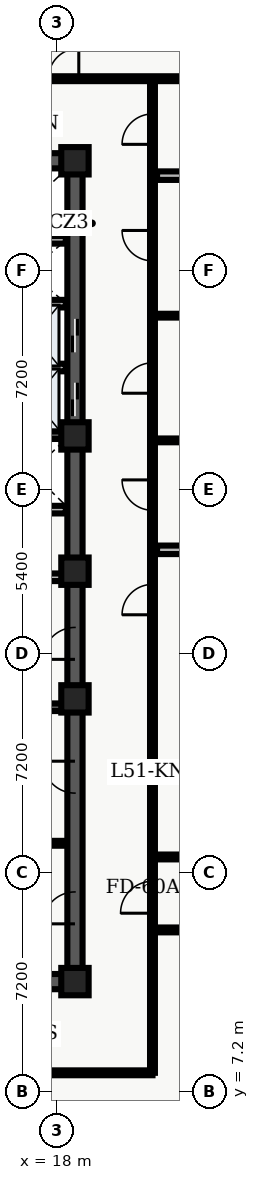
"""IFC4 building model, lengths in metres.
Left out: names, types, materials, properties, quantities, classifications, styles, units other than length and angle.
Written with IfcOpenShell. Run it as: python <this file> out.ifc"""

import sys

from ifc_helpers import new_model, entity, si_unit, converted_unit, direction, frame, origin_with_axes, origin_2d_with_axis, place, context, subcontext, project, spatial, polyline, rectangle, outline, extrude, element, fill, save


model = new_model("IFC4")
c1 = context("Model", 3, precision=1e-05, world=origin_with_axes(), true_north=direction((0.0, 1.0)))
c2 = subcontext(c1, "Body", "Model", "MODEL_VIEW")
j1 = project(units=[si_unit("LENGTHUNIT", "METRE"), converted_unit("PLANEANGLEUNIT", "DEGREE", entity("IfcPlaneAngleMeasure", 0.017), si_unit("PLANEANGLEUNIT", "RADIAN"), dimensions=[0, 0, 0, 0, 0, 0, 0])], contexts=[c1])
p1 = place(None, origin_with_axes())
s1 = spatial("IfcSite", under=j1, at=p1, CompositionType="ELEMENT")
p2 = place(p1, origin_with_axes())
s2 = spatial("IfcBuilding", under=s1, at=p2, CompositionType="ELEMENT")
p3 = place(p2, frame((0.0, 0.0, 208.2), z_axis=(0.0, 0.0, 1.0), x_axis=(1.0, 0.0, 0.0)))
s3 = spatial("IfcBuildingStorey", under=s2, at=p3, CompositionType="ELEMENT", Elevation=208.2)
p4 = place(p3, frame((11.4, 10.8, 0.0), z_axis=(0.0, 0.0, 1.0), x_axis=(1.0, 0.0, 0.0)))
e1 = element("IfcWall", 1, at=p4, inside=s3, PredefinedType="SHEAR", context=c2, shape_type="SweptSolid", body=[
    extrude(outline(polyline([(0.0, -0.25), (7.2, -0.25), (7.2, 0.25), (0.0, 0.25), (0.0, -0.25)])), origin_with_axes(), (0.0, 0.0, 1.0), 3.66),
])
p5 = place(p4, frame((2.625, 0.0, 0.0), z_axis=(0.0, 0.0, 1.0), x_axis=(1.0, 0.0, 0.0)))
e2 = element("IfcOpeningElement", 2, at=p5, cuts=e1, PredefinedType="OPENING", context=c2, shape_type="SweptSolid", body=[
    extrude(rectangle(XDim=1.05, YDim=0.52, at=origin_2d_with_axis()), origin_with_axes(), (0.0, 0.0, 1.0), 2.15),
])
p6 = place(p3, frame((11.4, 37.8, 0.0), z_axis=(0.0, 0.0, 1.0), x_axis=(1.0, 0.0, 0.0)))
e3 = element("IfcWall", 3, at=p6, inside=s3, PredefinedType="SHEAR", context=c2, shape_type="SweptSolid", body=[
    extrude(outline(polyline([(0.0, -0.25), (7.2, -0.25), (7.2, 0.25), (0.0, 0.25), (0.0, -0.25)])), origin_with_axes(), (0.0, 0.0, 1.0), 3.66),
])
p7 = place(p6, frame((2.625, 0.0, 0.0), z_axis=(0.0, 0.0, 1.0), x_axis=(1.0, 0.0, 0.0)))
e4 = element("IfcOpeningElement", 4, at=p7, cuts=e3, PredefinedType="OPENING", context=c2, shape_type="SweptSolid", body=[
    extrude(rectangle(XDim=1.05, YDim=0.52, at=origin_2d_with_axis()), origin_with_axes(), (0.0, 0.0, 1.0), 2.15),
])
p8 = place(p3, frame((18.6, 10.8, 0.0), z_axis=(0.0, 0.0, 1.0), x_axis=(0.0, 1.0, 0.0)))
e5 = element("IfcWall", 5, at=p8, inside=s3, PredefinedType="SHEAR", context=c2, shape_type="SweptSolid", body=[
    extrude(outline(polyline([(0.0, -0.25), (13.5, -0.25), (13.5, 0.25), (0.0, 0.25), (0.0, -0.25)])), origin_with_axes(), (0.0, 0.0, 1.0), 3.66),
])
p9 = place(p8, frame((11.125, 0.0, 0.0), z_axis=(0.0, 0.0, 1.0), x_axis=(1.0, 0.0, 0.0)))
e6 = element("IfcOpeningElement", 6, at=p9, cuts=e5, PredefinedType="OPENING", context=c2, shape_type="SweptSolid", body=[
    extrude(rectangle(XDim=1.05, YDim=0.52, at=origin_2d_with_axis()), origin_with_axes(), (0.0, 0.0, 1.0), 2.15),
])
p10 = place(p8, frame((2.425, 0.0, 0.0), z_axis=(0.0, 0.0, 1.0), x_axis=(1.0, 0.0, 0.0)))
e7 = element("IfcOpeningElement", 7, at=p10, cuts=e5, PredefinedType="OPENING", context=c2, shape_type="SweptSolid", body=[
    extrude(rectangle(XDim=1.05, YDim=0.52, at=origin_2d_with_axis()), origin_with_axes(), (0.0, 0.0, 1.0), 2.15),
])
p11 = place(p8, frame((6.725, 0.0, 0.0), z_axis=(0.0, 0.0, 1.0), x_axis=(1.0, 0.0, 0.0)))
e8 = element("IfcOpeningElement", 8, at=p11, cuts=e5, PredefinedType="OPENING", context=c2, shape_type="SweptSolid", body=[
    extrude(rectangle(XDim=1.05, YDim=0.52, at=origin_2d_with_axis()), origin_with_axes(), (0.0, 0.0, 1.0), 2.15),
])
p12 = place(p3, frame((18.6, 24.3, 0.0), z_axis=(0.0, 0.0, 1.0), x_axis=(0.0, 1.0, 0.0)))
e9 = element("IfcWall", 9, at=p12, inside=s3, PredefinedType="SHEAR", context=c2, shape_type="SweptSolid", body=[
    extrude(outline(polyline([(0.0, -0.25), (13.5, -0.25), (13.5, 0.25), (0.0, 0.25), (0.0, -0.25)])), origin_with_axes(), (0.0, 0.0, 1.0), 3.66),
])
p13 = place(p12, frame((5.65, 0.0, 0.0), z_axis=(0.0, 0.0, 1.0), x_axis=(1.0, 0.0, 0.0)))
e10 = element("IfcOpeningElement", 10, at=p13, cuts=e9, PredefinedType="OPENING", context=c2, shape_type="SweptSolid", body=[
    extrude(rectangle(XDim=1.1, YDim=0.52, at=origin_2d_with_axis()), origin_with_axes(), (0.0, 0.0, 1.0), 2.15),
])
p14 = place(p12, frame((7.75, 0.0, 0.0), z_axis=(0.0, 0.0, 1.0), x_axis=(1.0, 0.0, 0.0)))
e11 = element("IfcOpeningElement", 11, at=p14, cuts=e9, PredefinedType="OPENING", context=c2, shape_type="SweptSolid", body=[
    extrude(rectangle(XDim=1.1, YDim=0.52, at=origin_2d_with_axis()), origin_with_axes(), (0.0, 0.0, 1.0), 2.15),
])
for number, where, z_axis, x_axis in (
    (12, (11.65, 19.825, 0.0), (0.0, 0.0, 1.0), (1.0, 0.0, 0.0)),
    (13, (11.65, 28.775, 0.0), (0.0, 0.0, 1.0), (1.0, 0.0, 0.0)),
):
    element("IfcWall", number, at=place(p3, frame(where, z_axis=z_axis, x_axis=x_axis)), inside=s3, PredefinedType="SHEAR", context=c2, shape_type="SweptSolid", body=[
        extrude(outline(polyline([(0.0, -0.125), (6.7, -0.125), (6.7, 0.125), (0.0, 0.125), (0.0, -0.125)])), origin_with_axes(), (0.0, 0.0, 1.0), 3.66),
    ])
p15 = place(p3, frame((11.7, 24.1, 0.0), z_axis=(0.0, 0.0, 1.0), x_axis=(1.0, 0.0, 0.0)))
e14 = element("IfcWall", 14, at=p15, inside=s3, PredefinedType="SOLIDWALL", context=c2, shape_type="SweptSolid", body=[
    extrude(outline(polyline([(0.0, -0.125), (6.6, -0.125), (6.6, 0.125), (0.0, 0.125), (0.0, -0.125)])), origin_with_axes(), (0.0, 0.0, 1.0), 2.7),
])
p16 = place(p15, frame((3.6, 0.0, 0.0), z_axis=(0.0, 0.0, 1.0), x_axis=(1.0, 0.0, 0.0)))
e15 = element("IfcOpeningElement", 15, at=p16, cuts=e14, PredefinedType="OPENING", context=c2, shape_type="SweptSolid", body=[
    extrude(rectangle(XDim=0.9, YDim=0.27, at=origin_2d_with_axis()), origin_with_axes(), (0.0, 0.0, 1.0), 2.15),
])
p17 = place(p15, frame((5.65, 0.0, 0.0), z_axis=(0.0, 0.0, 1.0), x_axis=(1.0, 0.0, 0.0)))
e16 = element("IfcOpeningElement", 16, at=p17, cuts=e14, PredefinedType="OPENING", context=c2, shape_type="SweptSolid", body=[
    extrude(rectangle(XDim=0.9, YDim=0.27, at=origin_2d_with_axis()), origin_with_axes(), (0.0, 0.0, 1.0), 2.15),
])
p18 = place(p3, frame((11.7, 26.325, 0.0), z_axis=(0.0, 0.0, 1.0), x_axis=(1.0, 0.0, 0.0)))
e17 = element("IfcWall", 17, at=p18, inside=s3, PredefinedType="SOLIDWALL", context=c2, shape_type="SweptSolid", body=[
    extrude(outline(polyline([(0.0, -0.125), (6.6, -0.125), (6.6, 0.125), (0.0, 0.125), (0.0, -0.125)])), origin_with_axes(), (0.0, 0.0, 1.0), 2.7),
])
p19 = place(p18, frame((3.5, 0.0, 0.0), z_axis=(0.0, 0.0, 1.0), x_axis=(1.0, 0.0, 0.0)))
e18 = element("IfcOpeningElement", 18, at=p19, cuts=e17, PredefinedType="OPENING", context=c2, shape_type="SweptSolid", body=[
    extrude(rectangle(XDim=0.9, YDim=0.27, at=origin_2d_with_axis()), origin_with_axes(), (0.0, 0.0, 1.0), 2.15),
])
for number, where, z_axis, x_axis in (
    (19, (18.6, 10.8, 0.0), (0.0, 0.0, 1.0), (1.0, 0.0, 0.0)),
    (20, (18.6, 20.1, 0.0), (0.0, 0.0, 1.0), (1.0, 0.0, 0.0)),
    (21, (18.6, 24.3, 0.0), (0.0, 0.0, 1.0), (1.0, 0.0, 0.0)),
    (22, (18.6, 28.75, 0.0), (0.0, 0.0, 1.0), (1.0, 0.0, 0.0)),
    (23, (18.6, 37.8, 0.0), (0.0, 0.0, 1.0), (1.0, 0.0, 0.0)),
):
    element("IfcColumn", number, at=place(p3, frame(where, z_axis=z_axis, x_axis=x_axis)), inside=s3, PredefinedType="COLUMN", context=c2, shape_type="SweptSolid", body=[
        extrude(rectangle(XDim=0.9, YDim=0.9, at=origin_2d_with_axis()), origin_with_axes(), (0.0, 0.0, 1.0), 3.9),
    ])
p20 = place(p3, frame((15.84, 15.35, 0.0), z_axis=(0.0, 0.0, 1.0), x_axis=(1.0, 0.0, 0.0)))
e24 = element("IfcWall", 24, at=p20, inside=s3, PredefinedType="PARTITIONING", context=c2, shape_type="SweptSolid", body=[
    extrude(outline(polyline([(0.0, -0.08), (2.46, -0.08), (2.46, 0.08), (0.0, 0.08), (0.0, -0.08)])), origin_with_axes(), (0.0, 0.0, 1.0), 2.7),
])
for number, where, z_axis, x_axis in (
    (25, (15.84, 31.0, 0.0), (0.0, 0.0, 1.0), (1.0, 0.0, 0.0)),
    (26, (15.84, 33.1, 0.0), (0.0, 0.0, 1.0), (1.0, 0.0, 0.0)),
    (27, (15.84, 35.2, 0.0), (0.0, 0.0, 1.0), (1.0, 0.0, 0.0)),
):
    element("IfcWall", number, at=place(p3, frame(where, z_axis=z_axis, x_axis=x_axis)), inside=s3, PredefinedType="SOLIDWALL", context=c2, shape_type="SweptSolid", body=[
        extrude(outline(polyline([(0.0, -0.125), (2.46, -0.125), (2.46, 0.125), (0.0, 0.125), (0.0, -0.125)])), origin_with_axes(), (0.0, 0.0, 1.0), 2.7),
    ])
p21 = place(p3, frame((2.6, 7.8, 0.0), z_axis=(0.0, 0.0, 1.0), x_axis=(1.0, 0.0, 0.0)))
e28 = element("IfcWall", 28, at=p21, inside=s3, PredefinedType="PARTITIONING", context=c2, shape_type="SweptSolid", body=[
    extrude(outline(polyline([(0.0, -0.08), (18.55, -0.08), (18.55, 0.08), (0.0, 0.08), (0.0, -0.08)])), origin_with_axes(), (0.0, 0.0, 1.0), 2.7),
])
p22 = place(p21, frame((9.245, 0.0, 0.0), z_axis=(0.0, 0.0, 1.0), x_axis=(1.0, 0.0, 0.0)))
e29 = element("IfcOpeningElement", 29, at=p22, cuts=e28, PredefinedType="OPENING", context=c2, shape_type="SweptSolid", body=[
    extrude(rectangle(XDim=1.0, YDim=0.18, at=origin_2d_with_axis()), origin_with_axes(), (0.0, 0.0, 1.0), 2.15),
])
p23 = place(p3, frame((2.6, 40.5, 0.0), z_axis=(0.0, 0.0, 1.0), x_axis=(1.0, 0.0, 0.0)))
e30 = element("IfcWall", 30, at=p23, inside=s3, PredefinedType="PARTITIONING", context=c2, shape_type="SweptSolid", body=[
    extrude(outline(polyline([(0.0, -0.08), (27.751, -0.08), (27.751, 0.08), (0.0, 0.08), (0.0, -0.08)])), origin_with_axes(), (0.0, 0.0, 1.0), 2.7),
])
p24 = place(p23, frame((2.158, 0.0, 0.0), z_axis=(0.0, 0.0, 1.0), x_axis=(1.0, 0.0, 0.0)))
e31 = element("IfcOpeningElement", 31, at=p24, cuts=e30, PredefinedType="OPENING", context=c2, shape_type="SweptSolid", body=[
    extrude(rectangle(XDim=1.0, YDim=0.18, at=origin_2d_with_axis()), origin_with_axes(), (0.0, 0.0, 1.0), 2.15),
])
p25 = place(p23, frame((7.723, 0.0, 0.0), z_axis=(0.0, 0.0, 1.0), x_axis=(1.0, 0.0, 0.0)))
e32 = element("IfcOpeningElement", 32, at=p25, cuts=e30, PredefinedType="OPENING", context=c2, shape_type="SweptSolid", body=[
    extrude(rectangle(XDim=1.0, YDim=0.18, at=origin_2d_with_axis()), origin_with_axes(), (0.0, 0.0, 1.0), 2.15),
])
p26 = place(p23, frame((11.266, 0.0, 0.0), z_axis=(0.0, 0.0, 1.0), x_axis=(1.0, 0.0, 0.0)))
e33 = element("IfcOpeningElement", 33, at=p26, cuts=e30, PredefinedType="OPENING", context=c2, shape_type="SweptSolid", body=[
    extrude(rectangle(XDim=1.0, YDim=0.18, at=origin_2d_with_axis()), origin_with_axes(), (0.0, 0.0, 1.0), 2.15),
])
p27 = place(p23, frame((15.626, 0.0, 0.0), z_axis=(0.0, 0.0, 1.0), x_axis=(1.0, 0.0, 0.0)))
e34 = element("IfcOpeningElement", 34, at=p27, cuts=e30, PredefinedType="OPENING", context=c2, shape_type="SweptSolid", body=[
    extrude(rectangle(XDim=1.0, YDim=0.18, at=origin_2d_with_axis()), origin_with_axes(), (0.0, 0.0, 1.0), 2.15),
])
p28 = place(p3, frame((21.15, 7.8, 0.0), z_axis=(0.0, 0.0, 1.0), x_axis=(0.0, 1.0, 0.0)))
e35 = element("IfcWall", 35, at=p28, inside=s3, PredefinedType="PARTITIONING", context=c2, shape_type="SweptSolid", body=[
    extrude(outline(polyline([(0.0, -0.08), (32.7, -0.08), (32.7, 0.08), (0.0, 0.08), (0.0, -0.08)])), origin_with_axes(), (0.0, 0.0, 1.0), 2.7),
])
p29 = place(p28, frame((15.566, 0.0, 0.0), z_axis=(0.0, 0.0, 1.0), x_axis=(1.0, 0.0, 0.0)))
e36 = element("IfcOpeningElement", 36, at=p29, cuts=e35, PredefinedType="OPENING", context=c2, shape_type="SweptSolid", body=[
    extrude(rectangle(XDim=1.0, YDim=0.18, at=origin_2d_with_axis()), origin_with_axes(), (0.0, 0.0, 1.0), 2.15),
])
p30 = place(p28, frame((19.003, 0.0, 0.0), z_axis=(0.0, 0.0, 1.0), x_axis=(1.0, 0.0, 0.0)))
e37 = element("IfcOpeningElement", 37, at=p30, cuts=e35, PredefinedType="OPENING", context=c2, shape_type="SweptSolid", body=[
    extrude(rectangle(XDim=1.0, YDim=0.18, at=origin_2d_with_axis()), origin_with_axes(), (0.0, 0.0, 1.0), 2.15),
])
p31 = place(p28, frame((22.854, 0.0, 0.0), z_axis=(0.0, 0.0, 1.0), x_axis=(1.0, 0.0, 0.0)))
e38 = element("IfcOpeningElement", 38, at=p31, cuts=e35, PredefinedType="OPENING", context=c2, shape_type="SweptSolid", body=[
    extrude(rectangle(XDim=1.0, YDim=0.18, at=origin_2d_with_axis()), origin_with_axes(), (0.0, 0.0, 1.0), 2.15),
])
p32 = place(p28, frame((27.208, 0.0, 0.0), z_axis=(0.0, 0.0, 1.0), x_axis=(1.0, 0.0, 0.0)))
e39 = element("IfcOpeningElement", 39, at=p32, cuts=e35, PredefinedType="OPENING", context=c2, shape_type="SweptSolid", body=[
    extrude(rectangle(XDim=1.0, YDim=0.18, at=origin_2d_with_axis()), origin_with_axes(), (0.0, 0.0, 1.0), 2.15),
])
p33 = place(p28, frame((31.041, 0.0, 0.0), z_axis=(0.0, 0.0, 1.0), x_axis=(1.0, 0.0, 0.0)))
e40 = element("IfcOpeningElement", 40, at=p33, cuts=e35, PredefinedType="OPENING", context=c2, shape_type="SweptSolid", body=[
    extrude(rectangle(XDim=1.0, YDim=0.18, at=origin_2d_with_axis()), origin_with_axes(), (0.0, 0.0, 1.0), 2.15),
])
p34 = place(p28, frame((5.775, 0.0, 0.0), z_axis=(0.0, 0.0, 1.0), x_axis=(1.0, 0.0, 0.0)))
e41 = element("IfcOpeningElement", 41, at=p34, cuts=e35, PredefinedType="OPENING", context=c2, shape_type="SweptSolid", body=[
    extrude(rectangle(XDim=1.05, YDim=0.18, at=origin_2d_with_axis()), origin_with_axes(), (0.0, 0.0, 1.0), 2.15),
])
p35 = place(p3, frame((21.3, 25.003, 0.0), z_axis=(0.0, 0.0, 1.0), x_axis=(1.0, 0.0, 0.0)))
e42 = element("IfcWall", 42, at=p35, inside=s3, PredefinedType="PARTITIONING", context=c2, shape_type="SweptSolid", body=[
    extrude(outline(polyline([(0.0, -0.14), (9.051, -0.14), (9.051, 0.14), (0.0, 0.14), (0.0, -0.14)])), origin_with_axes(), (0.0, 0.0, 1.0), 2.7),
])
for number, where, z_axis, x_axis in (
    (43, (21.3, 28.603, 0.0), (0.0, 0.0, 1.0), (1.0, 0.0, 0.0)),
    (44, (21.3, 32.705, 0.0), (0.0, 0.0, 1.0), (1.0, 0.0, 0.0)),
):
    element("IfcWall", number, at=place(p3, frame(where, z_axis=z_axis, x_axis=x_axis)), inside=s3, PredefinedType="PARTITIONING", context=c2, shape_type="SweptSolid", body=[
        extrude(outline(polyline([(0.0, -0.062), (9.051, -0.062), (9.051, 0.062), (0.0, 0.062), (0.0, -0.062)])), origin_with_axes(), (0.0, 0.0, 1.0), 2.7),
    ])
p36 = place(p3, frame((21.3, 37.311, 0.0), z_axis=(0.0, 0.0, 1.0), x_axis=(1.0, 0.0, 0.0)))
e45 = element("IfcWall", 45, at=p36, inside=s3, PredefinedType="PARTITIONING", context=c2, shape_type="SweptSolid", body=[
    extrude(outline(polyline([(0.0, -0.14), (9.051, -0.14), (9.051, 0.14), (0.0, 0.14), (0.0, -0.14)])), origin_with_axes(), (0.0, 0.0, 1.0), 2.7),
])
p37 = place(p3, frame((21.15, 12.5, 0.0), z_axis=(0.0, 0.0, 1.0), x_axis=(1.0, 0.0, 0.0)))
e46 = element("IfcWall", 46, at=p37, inside=s3, PredefinedType="PARTITIONING", context=c2, shape_type="SweptSolid", body=[
    extrude(outline(polyline([(0.0, -0.08), (15.2, -0.08), (15.2, 0.08), (0.0, 0.08), (0.0, -0.08)])), origin_with_axes(), (0.0, 0.0, 1.0), 2.7),
])
p38 = place(p37, frame((7.65, 0.0, 0.0), z_axis=(0.0, 0.0, 1.0), x_axis=(1.0, 0.0, 0.0)))
e47 = element("IfcOpeningElement", 47, at=p38, cuts=e46, PredefinedType="OPENING", context=c2, shape_type="SweptSolid", body=[
    extrude(rectangle(XDim=1.0, YDim=0.18, at=origin_2d_with_axis()), origin_with_axes(), (0.0, 0.0, 1.0), 2.15),
])
p39 = place(p3, frame((21.15, 14.9, 0.0), z_axis=(0.0, 0.0, 1.0), x_axis=(1.0, 0.0, 0.0)))
e48 = element("IfcWall", 48, at=p39, inside=s3, PredefinedType="PARTITIONING", context=c2, shape_type="SweptSolid", body=[
    extrude(outline(polyline([(0.0, -0.08), (15.2, -0.08), (15.2, 0.08), (0.0, 0.08), (0.0, -0.08)])), origin_with_axes(), (0.0, 0.0, 1.0), 2.7),
])
p40 = place(p39, frame((1.764, 0.0, 0.0), z_axis=(0.0, 0.0, 1.0), x_axis=(1.0, 0.0, 0.0)))
e49 = element("IfcOpeningElement", 49, at=p40, cuts=e48, PredefinedType="OPENING", context=c2, shape_type="SweptSolid", body=[
    extrude(rectangle(XDim=1.0, YDim=0.18, at=origin_2d_with_axis()), origin_with_axes(), (0.0, 0.0, 1.0), 2.15),
])
p41 = place(p39, frame((4.899, 0.0, 0.0), z_axis=(0.0, 0.0, 1.0), x_axis=(1.0, 0.0, 0.0)))
e50 = element("IfcOpeningElement", 50, at=p41, cuts=e48, PredefinedType="OPENING", context=c2, shape_type="SweptSolid", body=[
    extrude(rectangle(XDim=1.0, YDim=0.18, at=origin_2d_with_axis()), origin_with_axes(), (0.0, 0.0, 1.0), 2.15),
])
p42 = place(p39, frame((8.576, 0.0, 0.0), z_axis=(0.0, 0.0, 1.0), x_axis=(1.0, 0.0, 0.0)))
e51 = element("IfcOpeningElement", 51, at=p42, cuts=e48, PredefinedType="OPENING", context=c2, shape_type="SweptSolid", body=[
    extrude(rectangle(XDim=1.0, YDim=0.18, at=origin_2d_with_axis()), origin_with_axes(), (0.0, 0.0, 1.0), 2.15),
])
p43 = place(p39, frame((12.911, 0.0, 0.0), z_axis=(0.0, 0.0, 1.0), x_axis=(1.0, 0.0, 0.0)))
e52 = element("IfcOpeningElement", 52, at=p43, cuts=e48, PredefinedType="OPENING", context=c2, shape_type="SweptSolid", body=[
    extrude(rectangle(XDim=1.0, YDim=0.18, at=origin_2d_with_axis()), origin_with_axes(), (0.0, 0.0, 1.0), 2.15),
])
p44 = place(p12, frame((5.65, 0.0, 0.0), z_axis=(0.0, 0.0, 1.0), x_axis=(1.0, 0.0, 0.0)))
e53 = element("IfcDoor", 53, at=p44, inside=s3, OperationType="SLIDING_TO_LEFT", PredefinedType="DOOR", context=c2, shape_type="SweptSolid", body=[
    extrude(rectangle(XDim=1.1, YDim=0.09, at=origin_2d_with_axis()), origin_with_axes(), (0.0, 0.0, 1.0), 2.15),
])
fill(e10, e53)
p45 = place(p12, frame((7.75, 0.0, 0.0), z_axis=(0.0, 0.0, 1.0), x_axis=(1.0, 0.0, 0.0)))
e54 = element("IfcDoor", 54, at=p45, inside=s3, OperationType="SLIDING_TO_RIGHT", PredefinedType="DOOR", context=c2, shape_type="SweptSolid", body=[
    extrude(rectangle(XDim=1.1, YDim=0.09, at=origin_2d_with_axis()), origin_with_axes(), (0.0, 0.0, 1.0), 2.15),
])
fill(e11, e54)
p46 = place(p8, frame((11.125, 0.0, 0.0), z_axis=(0.0, 0.0, 1.0), x_axis=(1.0, 0.0, 0.0)))
e55 = element("IfcDoor", 55, at=p46, inside=s3, OperationType="SINGLE_SWING_LEFT", PredefinedType="DOOR", context=c2, shape_type="SweptSolid", body=[
    extrude(rectangle(XDim=1.05, YDim=0.09, at=origin_2d_with_axis()), origin_with_axes(), (0.0, 0.0, 1.0), 2.15),
])
fill(e6, e55)
p47 = place(p8, frame((2.425, 0.0, 0.0), z_axis=(0.0, 0.0, 1.0), x_axis=(1.0, 0.0, 0.0)))
e56 = element("IfcDoor", 56, at=p47, inside=s3, OperationType="SINGLE_SWING_LEFT", PredefinedType="DOOR", context=c2, shape_type="SweptSolid", body=[
    extrude(rectangle(XDim=1.05, YDim=0.09, at=origin_2d_with_axis()), origin_with_axes(), (0.0, 0.0, 1.0), 2.15),
])
fill(e7, e56)
p48 = place(p8, frame((6.725, 0.0, 0.0), z_axis=(0.0, 0.0, 1.0), x_axis=(1.0, 0.0, 0.0)))
e57 = element("IfcDoor", 57, at=p48, inside=s3, OperationType="SINGLE_SWING_RIGHT", PredefinedType="DOOR", context=c2, shape_type="SweptSolid", body=[
    extrude(rectangle(XDim=1.05, YDim=0.09, at=origin_2d_with_axis()), origin_with_axes(), (0.0, 0.0, 1.0), 2.15),
])
fill(e8, e57)
p49 = place(p23, frame((15.626, 0.0, 0.0), z_axis=(0.0, 0.0, 1.0), x_axis=(1.0, 0.0, 0.0)))
e58 = element("IfcDoor", 58, at=p49, inside=s3, OperationType="SINGLE_SWING_RIGHT", PredefinedType="DOOR", context=c2, shape_type="SweptSolid", body=[
    extrude(rectangle(XDim=1.0, YDim=0.09, at=origin_2d_with_axis()), origin_with_axes(), (0.0, 0.0, 1.0), 2.15),
])
fill(e34, e58)
p50 = place(p28, frame((15.566, 0.0, 0.0), z_axis=(0.0, 0.0, 1.0), x_axis=(1.0, 0.0, 0.0)))
e59 = element("IfcDoor", 59, at=p50, inside=s3, OperationType="SINGLE_SWING_LEFT", PredefinedType="DOOR", context=c2, shape_type="SweptSolid", body=[
    extrude(rectangle(XDim=1.0, YDim=0.09, at=origin_2d_with_axis()), origin_with_axes(), (0.0, 0.0, 1.0), 2.15),
])
fill(e36, e59)
p51 = place(p28, frame((19.003, 0.0, 0.0), z_axis=(0.0, 0.0, 1.0), x_axis=(1.0, 0.0, 0.0)))
e60 = element("IfcDoor", 60, at=p51, inside=s3, OperationType="SINGLE_SWING_RIGHT", PredefinedType="DOOR", context=c2, shape_type="SweptSolid", body=[
    extrude(rectangle(XDim=1.0, YDim=0.09, at=origin_2d_with_axis()), origin_with_axes(), (0.0, 0.0, 1.0), 2.15),
])
fill(e37, e60)
p52 = place(p28, frame((22.854, 0.0, 0.0), z_axis=(0.0, 0.0, 1.0), x_axis=(1.0, 0.0, 0.0)))
e61 = element("IfcDoor", 61, at=p52, inside=s3, OperationType="SINGLE_SWING_LEFT", PredefinedType="DOOR", context=c2, shape_type="SweptSolid", body=[
    extrude(rectangle(XDim=1.0, YDim=0.09, at=origin_2d_with_axis()), origin_with_axes(), (0.0, 0.0, 1.0), 2.15),
])
fill(e38, e61)
p53 = place(p28, frame((27.208, 0.0, 0.0), z_axis=(0.0, 0.0, 1.0), x_axis=(1.0, 0.0, 0.0)))
e62 = element("IfcDoor", 62, at=p53, inside=s3, OperationType="SINGLE_SWING_RIGHT", PredefinedType="DOOR", context=c2, shape_type="SweptSolid", body=[
    extrude(rectangle(XDim=1.0, YDim=0.09, at=origin_2d_with_axis()), origin_with_axes(), (0.0, 0.0, 1.0), 2.15),
])
fill(e39, e62)
p54 = place(p28, frame((31.041, 0.0, 0.0), z_axis=(0.0, 0.0, 1.0), x_axis=(1.0, 0.0, 0.0)))
e63 = element("IfcDoor", 63, at=p54, inside=s3, OperationType="SINGLE_SWING_LEFT", PredefinedType="DOOR", context=c2, shape_type="SweptSolid", body=[
    extrude(rectangle(XDim=1.0, YDim=0.09, at=origin_2d_with_axis()), origin_with_axes(), (0.0, 0.0, 1.0), 2.15),
])
fill(e40, e63)
p55 = place(p28, frame((5.775, 0.0, 0.0), z_axis=(0.0, 0.0, 1.0), x_axis=(1.0, 0.0, 0.0)))
e64 = element("IfcDoor", 64, at=p55, inside=s3, OperationType="SINGLE_SWING_LEFT", PredefinedType="DOOR", context=c2, shape_type="SweptSolid", body=[
    extrude(rectangle(XDim=1.05, YDim=0.09, at=origin_2d_with_axis()), origin_with_axes(), (0.0, 0.0, 1.0), 2.15),
])
fill(e41, e64)
save(model, sys.argv[1])
